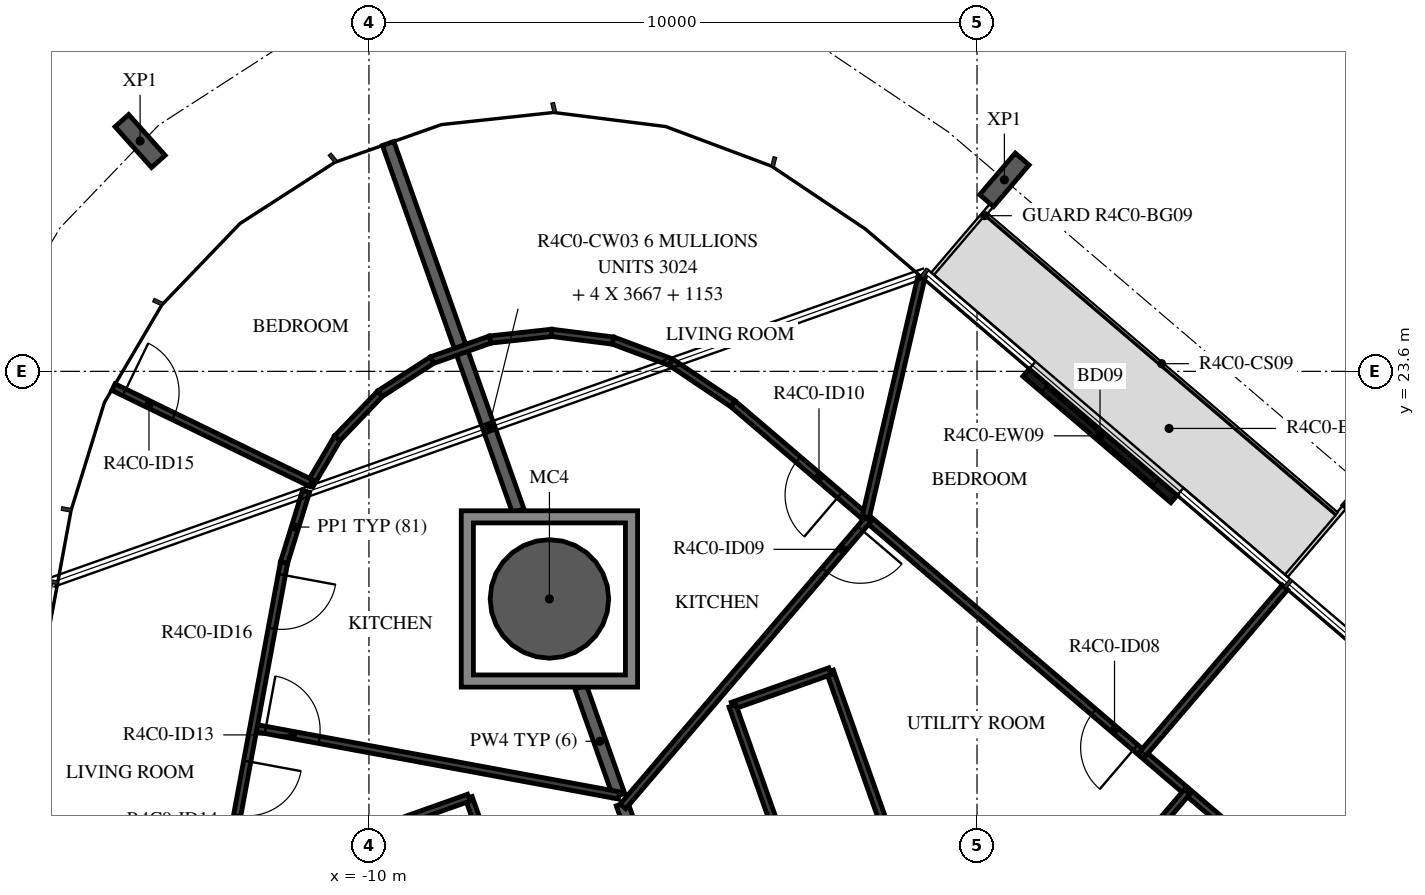
"""IFC4 building model, lengths in metres.
Left out: names, types, materials, properties, quantities, classifications, styles, units other than length and angle.
Written with IfcOpenShell. Run it as: python <this file> out.ifc"""

import sys

from ifc_helpers import new_model, si_unit, direction, frame, frame_2d, origin, origin_2d, place, context, subcontext, project, spatial, polyline, rectangle, hollow_circle, i_section, outline, extrude, element, fill, save


model = new_model("IFC4")
c1 = context("Model", 3, precision=1e-05, world=origin(), true_north=direction((0.0, 1.0)))
c2 = subcontext(c1, "Body", "Model", "MODEL_VIEW")
j1 = project(units=[si_unit("LENGTHUNIT", "METRE"), si_unit("PLANEANGLEUNIT", "RADIAN")], contexts=[c1])
p1 = place(None, origin())
s1 = spatial("IfcSite", under=j1, at=p1, CompositionType="ELEMENT")
p2 = place(p1, origin())
s2 = spatial("IfcBuilding", under=s1, at=p2, CompositionType="ELEMENT")
p3 = place(p2, frame((0.0, 0.0, 172.7)))
s3 = spatial("IfcBuildingStorey", under=s2, at=p3, CompositionType="ELEMENT", Elevation=172.7)
p4 = place(p3, frame((-7.032, 19.858, -0.38), z_axis=(0.0, 0.0, 1.0), x_axis=(1.0, 0.0, 0.0)))
e1 = element("IfcColumn", 1, at=p4, inside=s3, PredefinedType="COLUMN", context=c2, shape_type="SweptSolid", body=[
    extrude(hollow_circle(Radius=0.975, WallThickness=0.045, at=origin_2d()), origin(), (0.0, 0.0, 1.0), 3.5),
])
for number, where, z_axis, x_axis in (
    (2, (6.427, 21.645, -0.38), (0.0, 0.0, 1.0), (0.76, -0.649, 0.0)),
    (3, (0.45, 26.75, -0.38), (0.0, 0.0, 1.0), (0.76, -0.649, 0.0)),
    (4, (-13.763, 27.387, -0.38), (0.0, 0.0, 1.0), (0.746, 0.666, 0.0)),
):
    element("IfcColumn", number, at=place(p3, frame(where, z_axis=z_axis, x_axis=x_axis)), inside=s3, PredefinedType="COLUMN", context=c2, shape_type="SweptSolid", body=[
        extrude(i_section(OverallWidth=0.3, OverallDepth=0.9, WebThickness=0.019, FlangeThickness=0.035, FilletRadius=0.03, at=origin_2d()), origin(), (0.0, 0.0, 1.0), 3.5),
    ])
p5 = place(p3, frame((3.24, 21.5, 0.0), z_axis=(0.0, 0.0, 1.0), x_axis=(-0.760429407868, 0.649420599957, 0.0)))
e5 = element("IfcWall", 5, at=p5, inside=s3, PredefinedType="STANDARD", context=c2, shape_type="SweptSolid", body=[
    extrude(rectangle(XDim=3.2, YDim=0.16, at=frame_2d((1.6, 0.0))), origin(), (0.0, 0.0, 1.0), 3.12),
])
p6 = place(p5, frame((0.4, 0.0, 0.0)))
e6 = element("IfcOpeningElement", 6, at=p6, cuts=e5, PredefinedType="OPENING", context=c2, shape_type="SweptSolid", body=[
    extrude(rectangle(XDim=2.4, YDim=2.4, at=frame_2d((1.2, 1.2))), frame((0.0, 0.09, 0.0), z_axis=(0.0, -1.0, 0.0), x_axis=(1.0, 0.0, 0.0)), (0.0, 0.0, 1.0), 0.18),
])
p7 = place(p3, frame((-5.839, 16.488, 0.0), z_axis=(0.0, 0.0, 1.0), x_axis=(0.333840515054, -0.942629572265, 0.0)))
e7 = element("IfcWall", 7, at=p7, inside=s3, PredefinedType="STANDARD", context=c2, shape_type="SweptSolid", body=[
    extrude(rectangle(XDim=4.092, YDim=0.2, at=frame_2d((2.046, 0.0))), origin(), (0.0, 0.0, 1.0), 3.12),
])
p8 = place(p3, frame((-9.684, 27.348, 0.0), z_axis=(0.0, 0.0, 1.0), x_axis=(0.333810465454, -0.942640214055, 0.0)))
e8 = element("IfcWall", 8, at=p8, inside=s3, PredefinedType="STANDARD", context=c2, shape_type="SweptSolid", body=[
    extrude(rectangle(XDim=6.407, YDim=0.2, at=frame_2d((3.204, 0.0))), origin(), (0.0, 0.0, 1.0), 3.12),
])
p9 = place(p3, frame((-6.518, 18.408, 0.0), z_axis=(0.0, 0.0, 1.0), x_axis=(0.333725210903, -0.942670400303, 0.0)))
e9 = element("IfcWall", 9, at=p9, inside=s3, PredefinedType="STANDARD", context=c2, shape_type="SweptSolid", body=[
    extrude(rectangle(XDim=1.89, YDim=0.2, at=frame_2d((0.945, 0.0))), origin(), (0.0, 0.0, 1.0), 3.12),
])
p10 = place(p3, frame((8.702, 12.206, 0.0), z_axis=(0.0, 0.0, 1.0), x_axis=(-0.760401313718, 0.649453494945, 0.0)))
e10 = element("IfcWall", 10, at=p10, inside=s3, PredefinedType="PARTITIONING", context=c2, shape_type="SweptSolid", body=[
    extrude(rectangle(XDim=16.724, YDim=0.12, at=frame_2d((8.362, 0.0))), origin(), (0.0, 0.0, 1.0), 3.12),
])
p11 = place(p10, frame((0.2, 0.0, 0.0)))
e11 = element("IfcOpeningElement", 11, at=p11, cuts=e10, PredefinedType="OPENING", context=c2, shape_type="SweptSolid", body=[
    extrude(rectangle(XDim=0.9, YDim=2.1, at=frame_2d((0.45, 1.05))), frame((0.0, 0.07, 0.0), z_axis=(0.0, -1.0, 0.0), x_axis=(1.0, 0.0, 0.0)), (0.0, 0.0, 1.0), 0.14),
])
p12 = place(p10, frame((8.02, 0.0, 0.0)))
e12 = element("IfcOpeningElement", 12, at=p12, cuts=e10, PredefinedType="OPENING", context=c2, shape_type="SweptSolid", body=[
    extrude(rectangle(XDim=0.9, YDim=2.1, at=frame_2d((0.45, 1.05))), frame((0.0, 0.07, 0.0), z_axis=(0.0, -1.0, 0.0), x_axis=(1.0, 0.0, 0.0)), (0.0, 0.0, 1.0), 0.14),
])
p13 = place(p10, frame((14.412, 0.0, 0.0)))
e13 = element("IfcOpeningElement", 13, at=p13, cuts=e10, PredefinedType="OPENING", context=c2, shape_type="SweptSolid", body=[
    extrude(rectangle(XDim=0.9, YDim=2.1, at=frame_2d((0.45, 1.05))), frame((0.0, 0.07, 0.0), z_axis=(0.0, -1.0, 0.0), x_axis=(1.0, 0.0, 0.0)), (0.0, 0.0, 1.0), 0.14),
])
p14 = place(p3, frame((-1.249, 15.364, 0.0), z_axis=(0.0, 0.0, 1.0), x_axis=(-0.333811035895, 0.942640012048, 0.0)))
e14 = element("IfcWall", 14, at=p14, inside=s3, PredefinedType="PARTITIONING", context=c2, shape_type="SweptSolid", body=[
    extrude(rectangle(XDim=3.505, YDim=0.12, at=frame_2d((1.752, 0.0))), origin(), (0.0, 0.0, 1.0), 3.12),
])
p15 = place(p3, frame((-2.419, 18.668, 0.0), z_axis=(0.0, 0.0, 1.0), x_axis=(-0.942661115325, -0.333751436931, 0.0)))
e15 = element("IfcWall", 15, at=p15, inside=s3, PredefinedType="PARTITIONING", context=c2, shape_type="SweptSolid", body=[
    extrude(rectangle(XDim=1.7, YDim=0.12, at=frame_2d((0.85, 0.0))), origin(), (0.0, 0.0, 1.0), 3.12),
])
p16 = place(p3, frame((-4.021, 18.101, 0.0), z_axis=(0.0, 0.0, 1.0), x_axis=(0.333811035895, -0.942640012048, 0.0)))
e16 = element("IfcWall", 16, at=p16, inside=s3, PredefinedType="PARTITIONING", context=c2, shape_type="SweptSolid", body=[
    extrude(rectangle(XDim=3.505, YDim=0.12, at=frame_2d((1.752, 0.0))), origin(), (0.0, 0.0, 1.0), 3.12),
])
p17 = place(p3, frame((5.063, 20.048, 0.0), z_axis=(0.0, 0.0, 1.0), x_axis=(-0.649455626815, -0.760399492897, 0.0)))
e17 = element("IfcWall", 17, at=p17, inside=s3, PredefinedType="PARTITIONING", context=c2, shape_type="SweptSolid", body=[
    extrude(rectangle(XDim=3.6, YDim=0.12, at=frame_2d((1.8, 0.0))), origin(), (0.0, 0.0, 1.0), 2.73),
])
p18 = place(p3, frame((3.456, 16.686, 0.0), z_axis=(0.0, 0.0, 1.0), x_axis=(-0.649462010463, -0.760394040591, 0.0)))
e18 = element("IfcWall", 18, at=p18, inside=s3, PredefinedType="PARTITIONING", context=c2, shape_type="SweptSolid", body=[
    extrude(rectangle(XDim=2.467, YDim=0.12, at=frame_2d((1.233, 0.0))), origin(), (0.0, 0.0, 1.0), 3.12),
])
p19 = place(p3, frame((-0.914, 25.153, 0.0), z_axis=(0.0, 0.0, 1.0), x_axis=(-0.226085850586, -0.974107380202, 0.0)))
e19 = element("IfcWall", 19, at=p19, inside=s3, PredefinedType="PARTITIONING", context=c2, shape_type="SweptSolid", body=[
    extrude(rectangle(XDim=4.056, YDim=0.12, at=frame_2d((2.028, 0.0))), origin(), (0.0, 0.0, 1.0), 3.12),
])
p20 = place(p3, frame((-1.79, 21.167, 0.0), z_axis=(0.0, 0.0, 1.0), x_axis=(-0.649456490412, -0.7603987553, 0.0)))
e20 = element("IfcWall", 20, at=p20, inside=s3, PredefinedType="PARTITIONING", context=c2, shape_type="SweptSolid", body=[
    extrude(rectangle(XDim=6.21, YDim=0.12, at=frame_2d((3.105, 0.0))), origin(), (0.0, 0.0, 1.0), 3.12),
])
p21 = place(p20, frame((0.2, 0.0, 0.0)))
e21 = element("IfcOpeningElement", 21, at=p21, cuts=e20, PredefinedType="OPENING", context=c2, shape_type="SweptSolid", body=[
    extrude(rectangle(XDim=0.9, YDim=2.1, at=frame_2d((0.45, 1.05))), frame((0.0, 0.07, 0.0), z_axis=(0.0, -1.0, 0.0), x_axis=(1.0, 0.0, 0.0)), (0.0, 0.0, 1.0), 0.14),
])
p22 = place(p3, frame((-8.961, 23.785, 0.0), z_axis=(0.0, 0.0, 1.0), x_axis=(0.942630376568, 0.333838244022, 0.0)))
e22 = element("IfcWall", 22, at=p22, inside=s3, PredefinedType="PARTITIONING", context=c2, shape_type="SweptSolid", body=[
    extrude(rectangle(XDim=1.016, YDim=0.12, at=frame_2d((0.508, 0.0))), origin(), (0.0, 0.0, 1.0), 3.12),
])
p23 = place(p3, frame((-8.004, 24.124, 0.0), z_axis=(0.0, 0.0, 1.0), x_axis=(0.994216064839, 0.107398400431, 0.0)))
e23 = element("IfcWall", 23, at=p23, inside=s3, PredefinedType="PARTITIONING", context=c2, shape_type="SweptSolid", body=[
    extrude(rectangle(XDim=1.016, YDim=0.12, at=frame_2d((0.508, 0.0))), origin(), (0.0, 0.0, 1.0), 3.12),
])
p24 = place(p3, frame((-6.994, 24.233, 0.0), z_axis=(0.0, 0.0, 1.0), x_axis=(0.992188875952, -0.124744676991, 0.0)))
e24 = element("IfcWall", 24, at=p24, inside=s3, PredefinedType="PARTITIONING", context=c2, shape_type="SweptSolid", body=[
    extrude(rectangle(XDim=1.016, YDim=0.12, at=frame_2d((0.508, 0.0))), origin(), (0.0, 0.0, 1.0), 3.12),
])
p25 = place(p3, frame((-5.986, 24.106, 0.0), z_axis=(0.0, 0.0, 1.0), x_axis=(0.936625084254, -0.350333343469, 0.0)))
e25 = element("IfcWall", 25, at=p25, inside=s3, PredefinedType="PARTITIONING", context=c2, shape_type="SweptSolid", body=[
    extrude(rectangle(XDim=1.016, YDim=0.12, at=frame_2d((0.508, 0.0))), origin(), (0.0, 0.0, 1.0), 3.12),
])
p26 = place(p3, frame((-5.034, 23.75, 0.0), z_axis=(0.0, 0.0, 1.0), x_axis=(0.83070096574, -0.556718874764, 0.0)))
e26 = element("IfcWall", 26, at=p26, inside=s3, PredefinedType="PARTITIONING", context=c2, shape_type="SweptSolid", body=[
    extrude(rectangle(XDim=1.227, YDim=0.12, at=frame_2d((0.614, 0.0))), origin(), (0.0, 0.0, 1.0), 3.12),
])
p27 = place(p3, frame((-7.181, 13.263, 0.0), z_axis=(0.0, 0.0, 1.0), x_axis=(-0.333822798183, 0.942635846663, 0.0)))
e27 = element("IfcWall", 27, at=p27, inside=s3, PredefinedType="PARTITIONING", context=c2, shape_type="SweptSolid", body=[
    extrude(rectangle(XDim=3.527, YDim=0.12, at=frame_2d((1.764, 0.0))), origin(), (0.0, 0.0, 1.0), 3.12),
])
p28 = place(p3, frame((-8.359, 16.588, 0.0), z_axis=(0.0, 0.0, 1.0), x_axis=(-0.942661115325, -0.333751436931, 0.0)))
e28 = element("IfcWall", 28, at=p28, inside=s3, PredefinedType="PARTITIONING", context=c2, shape_type="SweptSolid", body=[
    extrude(rectangle(XDim=1.7, YDim=0.12, at=frame_2d((0.85, 0.0))), origin(), (0.0, 0.0, 1.0), 3.12),
])
p29 = place(p3, frame((-10.974, 21.728, 0.0), z_axis=(0.0, 0.0, 1.0), x_axis=(0.507353148194, 0.861738233466, 0.0)))
e29 = element("IfcWall", 29, at=p29, inside=s3, PredefinedType="PARTITIONING", context=c2, shape_type="SweptSolid", body=[
    extrude(rectangle(XDim=0.897, YDim=0.12, at=frame_2d((0.448, 0.0))), origin(), (0.0, 0.0, 1.0), 3.12),
])
p30 = place(p3, frame((-10.519, 22.501, 0.0), z_axis=(0.0, 0.0, 1.0), x_axis=(0.69266189308, 0.721262436201, 0.0)))
e30 = element("IfcWall", 30, at=p30, inside=s3, PredefinedType="PARTITIONING", context=c2, shape_type="SweptSolid", body=[
    extrude(rectangle(XDim=1.016, YDim=0.12, at=frame_2d((0.508, 0.0))), origin(), (0.0, 0.0, 1.0), 3.12),
])
p31 = place(p3, frame((-9.815, 23.234, 0.0), z_axis=(0.0, 0.0, 1.0), x_axis=(0.840310772539, 0.542104976508, 0.0)))
e31 = element("IfcWall", 31, at=p31, inside=s3, PredefinedType="PARTITIONING", context=c2, shape_type="SweptSolid", body=[
    extrude(rectangle(XDim=1.016, YDim=0.12, at=frame_2d((0.508, 0.0))), origin(), (0.0, 0.0, 1.0), 3.12),
])
p32 = place(p3, frame((-14.202, 23.341, 0.0), z_axis=(0.0, 0.0, 1.0), x_axis=(0.899466404534, -0.436989916491, 0.0)))
e32 = element("IfcWall", 32, at=p32, inside=s3, PredefinedType="PARTITIONING", context=c2, shape_type="SweptSolid", body=[
    extrude(rectangle(XDim=3.611, YDim=0.12, at=frame_2d((1.806, 0.0))), origin(), (0.0, 0.0, 1.0), 3.12),
])
p33 = place(p32, frame((0.2, 0.0, 0.0)))
e33 = element("IfcOpeningElement", 33, at=p33, cuts=e32, PredefinedType="OPENING", context=c2, shape_type="SweptSolid", body=[
    extrude(rectangle(XDim=0.9, YDim=2.1, at=frame_2d((0.45, 1.05))), frame((0.0, 0.07, 0.0), z_axis=(0.0, -1.0, 0.0), x_axis=(1.0, 0.0, 0.0)), (0.0, 0.0, 1.0), 0.14),
])
p34 = place(p3, frame((-11.899, 17.74, 0.0), z_axis=(0.0, 0.0, 1.0), x_axis=(0.983254721409, -0.182236529889, 0.0)))
e34 = element("IfcWall", 34, at=p34, inside=s3, PredefinedType="PARTITIONING", context=c2, shape_type="SweptSolid", body=[
    extrude(rectangle(XDim=6.114, YDim=0.12, at=frame_2d((3.057, 0.0))), origin(), (0.0, 0.0, 1.0), 3.12),
])
p35 = place(p34, frame((0.2, 0.0, 0.0)))
e35 = element("IfcOpeningElement", 35, at=p35, cuts=e34, PredefinedType="OPENING", context=c2, shape_type="SweptSolid", body=[
    extrude(rectangle(XDim=0.9, YDim=2.1, at=frame_2d((0.45, 1.05))), frame((0.0, 0.07, 0.0), z_axis=(0.0, -1.0, 0.0), x_axis=(1.0, 0.0, 0.0)), (0.0, 0.0, 1.0), 0.14),
])
p36 = place(p3, frame((-11.034, 21.625, 0.0), z_axis=(0.0, 0.0, 1.0), x_axis=(-0.295260042089, -0.955416928647, 0.0)))
e36 = element("IfcWall", 36, at=p36, inside=s3, PredefinedType="PARTITIONING", context=c2, shape_type="SweptSolid", body=[
    extrude(rectangle(XDim=1.227, YDim=0.12, at=frame_2d((0.614, 0.0))), origin(), (0.0, 0.0, 1.0), 3.12),
])
p37 = place(p3, frame((-11.396, 20.453, 0.0), z_axis=(0.0, 0.0, 1.0), x_axis=(-0.182223370439, -0.983257160292, 0.0)))
e37 = element("IfcWall", 37, at=p37, inside=s3, PredefinedType="PARTITIONING", context=c2, shape_type="SweptSolid", body=[
    extrude(rectangle(XDim=9.452, YDim=0.12, at=frame_2d((4.726, 0.0))), origin(), (0.0, 0.0, 1.0), 3.12),
])
p38 = place(p37, frame((3.319, 0.0, 0.0)))
e38 = element("IfcOpeningElement", 38, at=p38, cuts=e37, PredefinedType="OPENING", context=c2, shape_type="SweptSolid", body=[
    extrude(rectangle(XDim=0.9, YDim=2.1, at=frame_2d((0.45, 1.05))), frame((0.0, 0.07, 0.0), z_axis=(0.0, -1.0, 0.0), x_axis=(1.0, 0.0, 0.0)), (0.0, 0.0, 1.0), 0.14),
])
p39 = place(p37, frame((0.2, 0.0, 0.0)))
e39 = element("IfcOpeningElement", 39, at=p39, cuts=e37, PredefinedType="OPENING", context=c2, shape_type="SweptSolid", body=[
    extrude(rectangle(XDim=0.9, YDim=2.1, at=frame_2d((0.45, 1.05))), frame((0.0, 0.07, 0.0), z_axis=(0.0, -1.0, 0.0), x_axis=(1.0, 0.0, 0.0)), (0.0, 0.0, 1.0), 0.14),
])
p40 = place(p3, origin())
e40 = element("IfcWall", 40, at=p40, inside=s3, PredefinedType="STANDARD", context=c2, shape_type="SweptSolid", body=[
    extrude(outline(polyline([(-5.582, 21.308), (-5.582, 18.408), (-8.482, 18.408), (-8.482, 21.308), (-5.582, 21.308)]), holes=[polyline([(-8.282, 18.608), (-5.782, 18.608), (-5.782, 21.108), (-8.282, 21.108), (-8.282, 18.608)])]), origin(), (0.0, 0.0, 1.0), 3.12),
])
p41 = place(p6, origin())
e41 = element("IfcDoor", 41, at=p41, inside=s3, OperationType="DOUBLE_DOOR_SLIDING", PredefinedType="DOOR", context=c2, shape_type="SweptSolid", body=[
    extrude(rectangle(XDim=2.4, YDim=2.4, at=frame_2d((1.2, 1.2))), frame((0.0, 0.025, 0.0), z_axis=(0.0, -1.0, 0.0), x_axis=(1.0, 0.0, 0.0)), (0.0, 0.0, 1.0), 0.05),
])
fill(e6, e41)
p42 = place(p12, origin())
e42 = element("IfcDoor", 42, at=p42, inside=s3, OperationType="SINGLE_SWING_RIGHT", PredefinedType="DOOR", context=c2, shape_type="SweptSolid", body=[
    extrude(rectangle(XDim=0.9, YDim=2.1, at=frame_2d((0.45, 1.05))), frame((0.0, 0.025, 0.0), z_axis=(0.0, -1.0, 0.0), x_axis=(1.0, 0.0, 0.0)), (0.0, 0.0, 1.0), 0.05),
])
fill(e12, e42)
p43 = place(p21, origin())
e43 = element("IfcDoor", 43, at=p43, inside=s3, OperationType="SINGLE_SWING_RIGHT", PredefinedType="DOOR", context=c2, shape_type="SweptSolid", body=[
    extrude(rectangle(XDim=0.9, YDim=2.1, at=frame_2d((0.45, 1.05))), frame((0.0, 0.025, 0.0), z_axis=(0.0, -1.0, 0.0), x_axis=(1.0, 0.0, 0.0)), (0.0, 0.0, 1.0), 0.05),
])
fill(e21, e43)
p44 = place(p13, origin())
e44 = element("IfcDoor", 44, at=p44, inside=s3, OperationType="SINGLE_SWING_RIGHT", PredefinedType="DOOR", context=c2, shape_type="SweptSolid", body=[
    extrude(rectangle(XDim=0.9, YDim=2.1, at=frame_2d((0.45, 1.05))), frame((0.0, 0.025, 0.0), z_axis=(0.0, -1.0, 0.0), x_axis=(1.0, 0.0, 0.0)), (0.0, 0.0, 1.0), 0.05),
])
fill(e13, e44)
p45 = place(p35, origin())
e45 = element("IfcDoor", 45, at=p45, inside=s3, OperationType="SINGLE_SWING_LEFT", PredefinedType="DOOR", context=c2, shape_type="SweptSolid", body=[
    extrude(rectangle(XDim=0.9, YDim=2.1, at=frame_2d((0.45, 1.05))), frame((0.0, 0.025, 0.0), z_axis=(0.0, -1.0, 0.0), x_axis=(1.0, 0.0, 0.0)), (0.0, 0.0, 1.0), 0.05),
])
fill(e35, e45)
p46 = place(p38, origin())
e46 = element("IfcDoor", 46, at=p46, inside=s3, OperationType="SINGLE_SWING_LEFT", PredefinedType="DOOR", context=c2, shape_type="SweptSolid", body=[
    extrude(rectangle(XDim=0.9, YDim=2.1, at=frame_2d((0.45, 1.05))), frame((0.0, 0.025, 0.0), z_axis=(0.0, -1.0, 0.0), x_axis=(1.0, 0.0, 0.0)), (0.0, 0.0, 1.0), 0.05),
])
fill(e38, e46)
p47 = place(p33, origin())
e47 = element("IfcDoor", 47, at=p47, inside=s3, OperationType="SINGLE_SWING_LEFT", PredefinedType="DOOR", context=c2, shape_type="SweptSolid", body=[
    extrude(rectangle(XDim=0.9, YDim=2.1, at=frame_2d((0.45, 1.05))), frame((0.0, 0.025, 0.0), z_axis=(0.0, -1.0, 0.0), x_axis=(1.0, 0.0, 0.0)), (0.0, 0.0, 1.0), 0.05),
])
fill(e33, e47)
p48 = place(p39, origin())
e48 = element("IfcDoor", 48, at=p48, inside=s3, OperationType="SINGLE_SWING_RIGHT", PredefinedType="DOOR", context=c2, shape_type="SweptSolid", body=[
    extrude(rectangle(XDim=0.9, YDim=2.1, at=frame_2d((0.45, 1.05))), frame((0.0, 0.025, 0.0), z_axis=(0.0, -1.0, 0.0), x_axis=(1.0, 0.0, 0.0)), (0.0, 0.0, 1.0), 0.05),
])
fill(e39, e48)
save(model, sys.argv[1])
